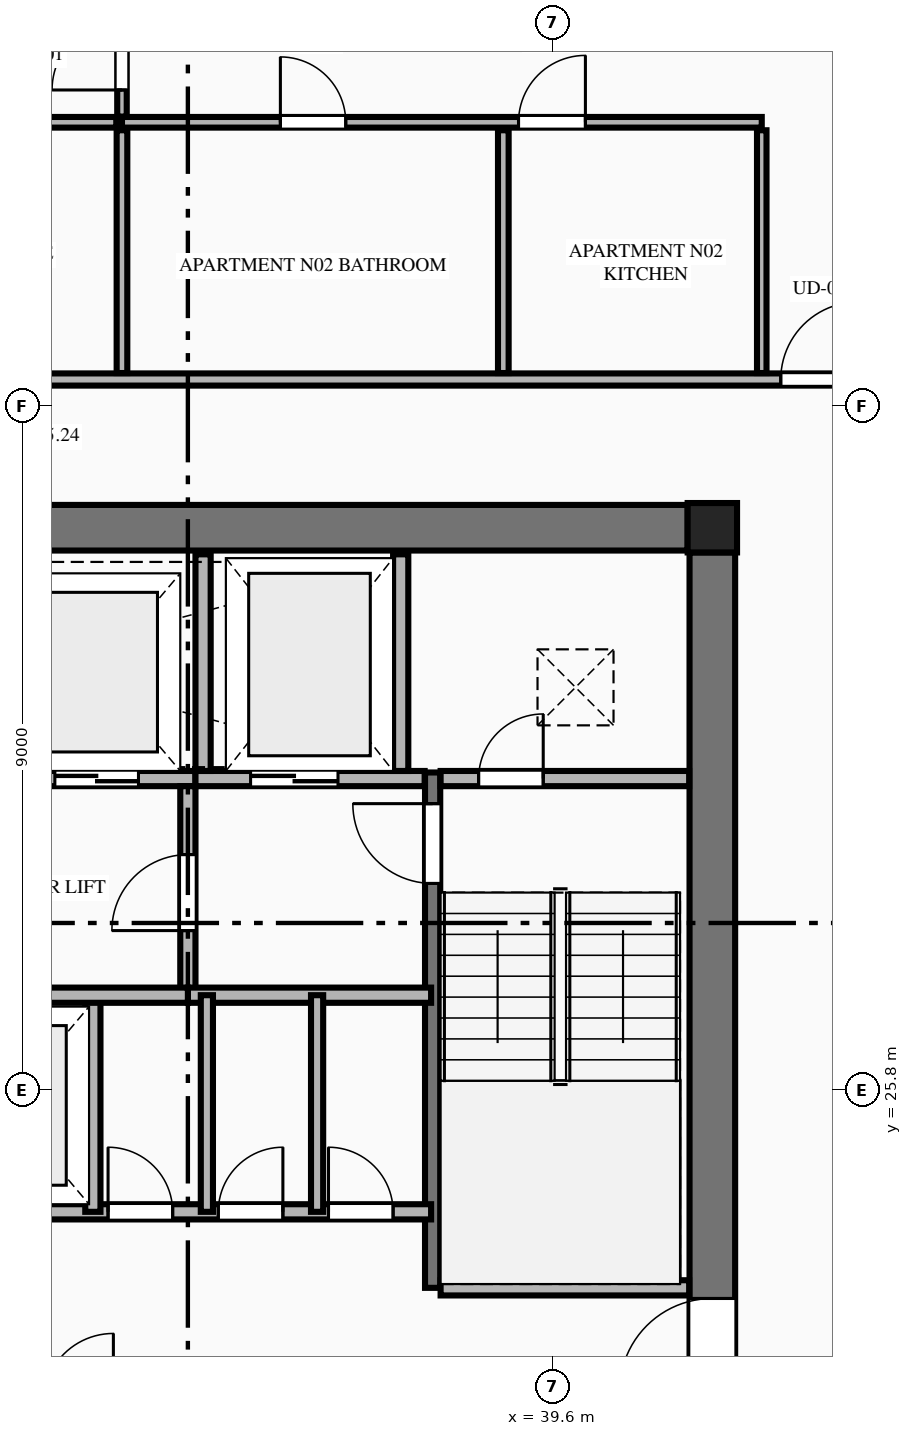
"""IFC4 building model, lengths in metres.
Left out: names, types, materials, properties, quantities, classifications, styles, units other than length and angle.
Written with IfcOpenShell. Run it as: python <this file> out.ifc"""

import sys

from ifc_helpers import new_model, si_unit, direction, frame, frame_2d, origin, origin_2d, place, context, subcontext, project, spatial, rectangle, extrude, element, fill, save


model = new_model("IFC4")
c1 = context("Model", 3, precision=1e-05, world=origin(), true_north=direction((0.0, 1.0)))
c2 = subcontext(c1, "Body", "Model", "MODEL_VIEW")
j1 = project(units=[si_unit("LENGTHUNIT", "METRE"), si_unit("PLANEANGLEUNIT", "RADIAN")], contexts=[c1])
p1 = place(None, origin())
s1 = spatial("IfcSite", under=j1, at=p1, CompositionType="ELEMENT")
p2 = place(p1, origin())
s2 = spatial("IfcBuilding", under=s1, at=p2, CompositionType="ELEMENT")
p3 = place(p2, frame((0.0, 0.0, 193.2)))
s3 = spatial("IfcBuildingStorey", under=s2, at=p3, CompositionType="ELEMENT", Elevation=193.2)
p4 = place(p3, frame((41.7, 33.2, 0.0), z_axis=(0.0, 0.0, 1.0), x_axis=(1.0, 0.0, 0.0)))
e1 = element("IfcColumn", 1, at=p4, inside=s3, PredefinedType="COLUMN", context=c2, shape_type="SweptSolid", body=[
    extrude(rectangle(XDim=0.65, YDim=0.65, at=origin_2d()), origin(), (0.0, 0.0, 1.0), 3.55),
])
p5 = place(p3, frame((23.425, 33.2, 0.0), z_axis=(0.0, 0.0, 1.0), x_axis=(1.0, 0.0, 0.0)))
e2 = element("IfcWall", 2, at=p5, inside=s3, PredefinedType="SHEAR", context=c2, shape_type="SweptSolid", body=[
    extrude(rectangle(XDim=17.95, YDim=0.6, at=frame_2d((8.975, 0.0))), origin(), (0.0, 0.0, 1.0), 3.35),
])
p6 = place(p3, frame((41.7, 18.925, 0.0), z_axis=(0.0, 0.0, 1.0), x_axis=(0.0, 1.0, 0.0)))
e3 = element("IfcWall", 3, at=p6, inside=s3, PredefinedType="SHEAR", context=c2, shape_type="SweptSolid", body=[
    extrude(rectangle(XDim=13.95, YDim=0.6, at=frame_2d((6.975, 0.0))), origin(), (0.0, 0.0, 1.0), 3.35),
])
p7 = place(p6, frame((2.915, 0.0, 0.0)))
e4 = element("IfcOpeningElement", 4, at=p7, cuts=e3, PredefinedType="OPENING", context=c2, shape_type="SweptSolid", body=[
    extrude(rectangle(XDim=1.22, YDim=2.25, at=frame_2d((0.61, 1.125))), frame((0.0, 0.31, 0.0), z_axis=(0.0, -1.0, 0.0), x_axis=(1.0, 0.0, 0.0)), (0.0, 0.0, 1.0), 0.62),
])
p8 = place(p3, frame((38.02, 23.2, 0.0), z_axis=(0.0, 0.0, 1.0), x_axis=(0.0, 1.0, 0.0)))
e5 = element("IfcWall", 5, at=p8, inside=s3, PredefinedType="SHEAR", context=c2, shape_type="SweptSolid", body=[
    extrude(rectangle(XDim=6.78, YDim=0.2, at=frame_2d((3.39, 0.0))), origin(), (0.0, 0.0, 1.0), 3.55),
])
p9 = place(p8, frame((5.32, 0.0, 0.0)))
e6 = element("IfcOpeningElement", 6, at=p9, cuts=e5, PredefinedType="OPENING", context=c2, shape_type="SweptSolid", body=[
    extrude(rectangle(XDim=1.05, YDim=2.15, at=frame_2d((0.525, 1.075))), frame((0.0, 0.11, 0.0), z_axis=(0.0, -1.0, 0.0), x_axis=(1.0, 0.0, 0.0)), (0.0, 0.0, 1.0), 0.22),
])
p10 = place(p3, frame((38.125, 23.2, 0.0), z_axis=(0.0, 0.0, 1.0), x_axis=(1.0, 0.0, 0.0)))
e7 = element("IfcWall", 7, at=p10, inside=s3, PredefinedType="PLUMBINGWALL", context=c2, shape_type="SweptSolid", body=[
    extrude(rectangle(XDim=3.27, YDim=0.2, at=frame_2d((1.635, 0.0))), origin(), (0.0, 0.0, 1.0), 3.35),
])
p11 = place(p3, frame((29.9, 29.9, 0.0), z_axis=(0.0, 0.0, 1.0), x_axis=(1.0, 0.0, 0.0)))
e8 = element("IfcWall", 8, at=p11, inside=s3, PredefinedType="PLUMBINGWALL", context=c2, shape_type="SweptSolid", body=[
    extrude(rectangle(XDim=5.0, YDim=0.2, at=frame_2d((2.5, 0.0))), origin(), (0.0, 0.0, 1.0), 3.35),
])
p12 = place(p11, frame((0.75, 0.0, 0.0)))
e9 = element("IfcOpeningElement", 9, at=p12, cuts=e8, PredefinedType="OPENING", context=c2, shape_type="SweptSolid", body=[
    extrude(rectangle(XDim=1.1, YDim=2.2, at=frame_2d((0.55, 1.1))), frame((0.0, 0.11, 0.0), z_axis=(0.0, -1.0, 0.0), x_axis=(1.0, 0.0, 0.0)), (0.0, 0.0, 1.0), 0.22),
])
p13 = place(p11, frame((3.15, 0.0, 0.0)))
e10 = element("IfcOpeningElement", 10, at=p13, cuts=e8, PredefinedType="OPENING", context=c2, shape_type="SweptSolid", body=[
    extrude(rectangle(XDim=1.1, YDim=2.2, at=frame_2d((0.55, 1.1))), frame((0.0, 0.11, 0.0), z_axis=(0.0, -1.0, 0.0), x_axis=(1.0, 0.0, 0.0)), (0.0, 0.0, 1.0), 0.22),
])
p14 = place(p3, frame((34.9, 29.9, 0.0), z_axis=(0.0, 0.0, 1.0), x_axis=(1.0, 0.0, 0.0)))
e11 = element("IfcWall", 11, at=p14, inside=s3, PredefinedType="PLUMBINGWALL", context=c2, shape_type="SweptSolid", body=[
    extrude(rectangle(XDim=3.015, YDim=0.2, at=frame_2d((1.508, 0.0))), origin(), (0.0, 0.0, 1.0), 3.35),
])
p15 = place(p14, frame((0.725, 0.0, 0.0)))
e12 = element("IfcOpeningElement", 12, at=p15, cuts=e11, PredefinedType="OPENING", context=c2, shape_type="SweptSolid", body=[
    extrude(rectangle(XDim=1.15, YDim=2.2, at=frame_2d((0.575, 1.1))), frame((0.0, 0.11, 0.0), z_axis=(0.0, -1.0, 0.0), x_axis=(1.0, 0.0, 0.0)), (0.0, 0.0, 1.0), 0.22),
])
p16 = place(p3, frame((38.125, 29.9, 0.0), z_axis=(0.0, 0.0, 1.0), x_axis=(1.0, 0.0, 0.0)))
e13 = element("IfcWall", 13, at=p16, inside=s3, PredefinedType="PLUMBINGWALL", context=c2, shape_type="SweptSolid", body=[
    extrude(rectangle(XDim=3.27, YDim=0.2, at=frame_2d((1.635, 0.0))), origin(), (0.0, 0.0, 1.0), 3.35),
])
p17 = place(p16, frame((0.5, 0.0, 0.0)))
e14 = element("IfcOpeningElement", 14, at=p17, cuts=e13, PredefinedType="OPENING", context=c2, shape_type="SweptSolid", body=[
    extrude(rectangle(XDim=0.85, YDim=2.05, at=frame_2d((0.425, 1.025))), frame((0.0, 0.11, 0.0), z_axis=(0.0, -1.0, 0.0), x_axis=(1.0, 0.0, 0.0)), (0.0, 0.0, 1.0), 0.22),
])
for number, where, z_axis, x_axis in (
    (15, (35.0, 30.0, 0.0), (0.0, 0.0, 1.0), (0.0, 1.0, 0.0)),
    (16, (37.6, 30.0, 0.0), (0.0, 0.0, 1.0), (0.0, 1.0, 0.0)),
):
    element("IfcWall", number, at=place(p3, frame(where, z_axis=z_axis, x_axis=x_axis)), inside=s3, PredefinedType="PLUMBINGWALL", context=c2, shape_type="SweptSolid", body=[
        extrude(rectangle(XDim=2.85, YDim=0.2, at=frame_2d((1.425, 0.0))), origin(), (0.0, 0.0, 1.0), 3.35),
    ])
p18 = place(p3, frame((34.8, 27.05, 0.0), z_axis=(0.0, 0.0, 1.0), x_axis=(0.0, 1.0, 0.0)))
e17 = element("IfcWall", 17, at=p18, inside=s3, PredefinedType="PLUMBINGWALL", context=c2, shape_type="SweptSolid", body=[
    extrude(rectangle(XDim=2.75, YDim=0.2, at=frame_2d((1.375, 0.0))), origin(), (0.0, 0.0, 1.0), 3.35),
])
p19 = place(p18, frame((0.85, 0.0, 0.0)))
e18 = element("IfcOpeningElement", 18, at=p19, cuts=e17, PredefinedType="OPENING", context=c2, shape_type="SweptSolid", body=[
    extrude(rectangle(XDim=1.0, YDim=2.15, at=frame_2d((0.5, 1.075))), frame((0.0, 0.11, 0.0), z_axis=(0.0, -1.0, 0.0), x_axis=(1.0, 0.0, 0.0)), (0.0, 0.0, 1.0), 0.22),
])
p20 = place(p3, frame((34.8, 27.05, 0.0), z_axis=(0.0, 0.0, 1.0), x_axis=(1.0, 0.0, 0.0)))
e19 = element("IfcWall", 19, at=p20, inside=s3, PredefinedType="PLUMBINGWALL", context=c2, shape_type="SweptSolid", body=[
    extrude(rectangle(XDim=3.2, YDim=0.2, at=frame_2d((1.6, 0.0))), origin(), (0.0, 0.0, 1.0), 3.35),
])
p21 = place(p3, frame((31.2, 24.2, 0.0), z_axis=(0.0, 0.0, 1.0), x_axis=(1.0, 0.0, 0.0)))
e20 = element("IfcWall", 20, at=p21, inside=s3, PredefinedType="PLUMBINGWALL", context=c2, shape_type="SweptSolid", body=[
    extrude(rectangle(XDim=6.8, YDim=0.2, at=frame_2d((3.4, 0.0))), origin(), (0.0, 0.0, 1.0), 3.35),
])
p22 = place(p21, frame((0.65, 0.0, 0.0)))
e21 = element("IfcOpeningElement", 21, at=p22, cuts=e20, PredefinedType="OPENING", context=c2, shape_type="SweptSolid", body=[
    extrude(rectangle(XDim=1.1, YDim=2.2, at=frame_2d((0.55, 1.1))), frame((0.0, 0.11, 0.0), z_axis=(0.0, -1.0, 0.0), x_axis=(1.0, 0.0, 0.0)), (0.0, 0.0, 1.0), 0.22),
])
p23 = place(p21, frame((2.55, 0.0, 0.0)))
e22 = element("IfcOpeningElement", 22, at=p23, cuts=e20, PredefinedType="OPENING", context=c2, shape_type="SweptSolid", body=[
    extrude(rectangle(XDim=0.85, YDim=2.05, at=frame_2d((0.425, 1.025))), frame((0.0, 0.11, 0.0), z_axis=(0.0, -1.0, 0.0), x_axis=(1.0, 0.0, 0.0)), (0.0, 0.0, 1.0), 0.22),
])
p24 = place(p21, frame((4.0, 0.0, 0.0)))
e23 = element("IfcOpeningElement", 23, at=p24, cuts=e20, PredefinedType="OPENING", context=c2, shape_type="SweptSolid", body=[
    extrude(rectangle(XDim=0.85, YDim=2.05, at=frame_2d((0.425, 1.025))), frame((0.0, 0.11, 0.0), z_axis=(0.0, -1.0, 0.0), x_axis=(1.0, 0.0, 0.0)), (0.0, 0.0, 1.0), 0.22),
])
p25 = place(p21, frame((5.45, 0.0, 0.0)))
e24 = element("IfcOpeningElement", 24, at=p25, cuts=e20, PredefinedType="OPENING", context=c2, shape_type="SweptSolid", body=[
    extrude(rectangle(XDim=0.85, YDim=2.05, at=frame_2d((0.425, 1.025))), frame((0.0, 0.11, 0.0), z_axis=(0.0, -1.0, 0.0), x_axis=(1.0, 0.0, 0.0)), (0.0, 0.0, 1.0), 0.22),
])
p26 = place(p3, frame((33.55, 24.2, 0.0), z_axis=(0.0, 0.0, 1.0), x_axis=(0.0, 1.0, 0.0)))
e25 = element("IfcWall", 25, at=p26, inside=s3, PredefinedType="PLUMBINGWALL", context=c2, shape_type="SweptSolid", body=[
    extrude(rectangle(XDim=2.85, YDim=0.2, at=frame_2d((1.425, 0.0))), origin(), (0.0, 0.0, 1.0), 3.35),
])
p27 = place(p3, frame((31.25, 27.05, 0.0), z_axis=(0.0, 0.0, 1.0), x_axis=(1.0, 0.0, 0.0)))
e26 = element("IfcWall", 26, at=p27, inside=s3, PredefinedType="PLUMBINGWALL", context=c2, shape_type="SweptSolid", body=[
    extrude(rectangle(XDim=3.55, YDim=0.2, at=frame_2d((1.775, 0.0))), origin(), (0.0, 0.0, 1.0), 3.35),
])
for number, where, z_axis, x_axis in (
    (27, (35.05, 24.2, 0.0), (0.0, 0.0, 1.0), (0.0, 1.0, 0.0)),
    (28, (36.5, 24.2, 0.0), (0.0, 0.0, 1.0), (0.0, 1.0, 0.0)),
):
    element("IfcWall", number, at=place(p3, frame(where, z_axis=z_axis, x_axis=x_axis)), inside=s3, PredefinedType="PARTITIONING", context=c2, shape_type="SweptSolid", body=[
        extrude(rectangle(XDim=2.85, YDim=0.16, at=frame_2d((1.425, 0.0))), origin(), (0.0, 0.0, 1.0), 3.35),
    ])
p28 = place(p3, frame((28.952, 35.15, 0.0), z_axis=(0.0, 0.0, 1.0), x_axis=(1.0, 0.0, 0.0)))
e29 = element("IfcWall", 29, at=p28, inside=s3, PredefinedType="PARTITIONING", context=c2, shape_type="SweptSolid", body=[
    extrude(rectangle(XDim=15.553, YDim=0.16, at=frame_2d((7.776, 0.0))), origin(), (0.0, 0.0, 1.0), 3.35),
])
p29 = place(p28, frame((13.648, 0.0, 0.0)))
e30 = element("IfcOpeningElement", 30, at=p29, cuts=e29, PredefinedType="OPENING", context=c2, shape_type="SweptSolid", body=[
    extrude(rectangle(XDim=1.02, YDim=2.25, at=frame_2d((0.51, 1.125))), frame((0.0, 0.09, 0.0), z_axis=(0.0, -1.0, 0.0), x_axis=(1.0, 0.0, 0.0)), (0.0, 0.0, 1.0), 0.18),
])
p30 = place(p3, frame((42.35, 35.235, 0.0), z_axis=(0.0, 0.0, 1.0), x_axis=(0.0, 1.0, 0.0)))
e31 = element("IfcWall", 31, at=p30, inside=s3, PredefinedType="PARTITIONING", context=c2, shape_type="SweptSolid", body=[
    extrude(rectangle(XDim=3.194, YDim=0.125, at=frame_2d((1.597, 0.0))), origin(), (0.0, 0.0, 1.0), 2.807),
])
p31 = place(p3, frame((33.933, 38.534, 0.0), z_axis=(0.0, 0.0, 1.0), x_axis=(1.0, 0.0, 0.0)))
e32 = element("IfcWall", 32, at=p31, inside=s3, PredefinedType="PLUMBINGWALL", context=c2, shape_type="SweptSolid", body=[
    extrude(rectangle(XDim=8.417, YDim=0.14, at=frame_2d((4.208, 0.0))), origin(), (0.0, 0.0, 1.0), 3.35),
])
p32 = place(p31, frame((2.084, 0.0, 0.0)))
e33 = element("IfcOpeningElement", 33, at=p32, cuts=e32, PredefinedType="OPENING", context=c2, shape_type="SweptSolid", body=[
    extrude(rectangle(XDim=0.86, YDim=2.1, at=frame_2d((0.43, 1.05))), frame((0.0, 0.08, 0.0), z_axis=(0.0, -1.0, 0.0), x_axis=(1.0, 0.0, 0.0)), (0.0, 0.0, 1.0), 0.16),
])
p33 = place(p31, frame((5.217, 0.0, 0.0)))
e34 = element("IfcOpeningElement", 34, at=p33, cuts=e32, PredefinedType="OPENING", context=c2, shape_type="SweptSolid", body=[
    extrude(rectangle(XDim=0.88, YDim=2.15, at=frame_2d((0.44, 1.075))), frame((0.0, 0.08, 0.0), z_axis=(0.0, -1.0, 0.0), x_axis=(1.0, 0.0, 0.0)), (0.0, 0.0, 1.0), 0.16),
])
p34 = place(p3, frame((28.952, 38.534, 0.0), z_axis=(0.0, 0.0, 1.0), x_axis=(1.0, 0.0, 0.0)))
e35 = element("IfcWall", 35, at=p34, inside=s3, PredefinedType="PLUMBINGWALL", context=c2, shape_type="SweptSolid", body=[
    extrude(rectangle(XDim=4.906, YDim=0.14, at=frame_2d((2.453, 0.0))), origin(), (0.0, 0.0, 1.0), 3.35),
])
p35 = place(p34, frame((2.028, 0.0, 0.0)))
e36 = element("IfcOpeningElement", 36, at=p35, cuts=e35, PredefinedType="OPENING", context=c2, shape_type="SweptSolid", body=[
    extrude(rectangle(XDim=0.86, YDim=2.1, at=frame_2d((0.43, 1.05))), frame((0.0, 0.08, 0.0), z_axis=(0.0, -1.0, 0.0), x_axis=(1.0, 0.0, 0.0)), (0.0, 0.0, 1.0), 0.16),
])
for number, where, z_axis, x_axis in (
    (37, (38.95, 35.235, 0.0), (0.0, 0.0, 1.0), (0.0, 1.0, 0.0)),
    (38, (33.933, 35.235, 0.0), (0.0, 0.0, 1.0), (0.0, 1.0, 0.0)),
):
    element("IfcWall", number, at=place(p3, frame(where, z_axis=z_axis, x_axis=x_axis)), inside=s3, PredefinedType="PLUMBINGWALL", context=c2, shape_type="SweptSolid", body=[
        extrude(rectangle(XDim=3.194, YDim=0.14, at=frame_2d((1.597, 0.0))), origin(), (0.0, 0.0, 1.0), 3.35),
    ])
p36 = place(p3, frame((33.933, 38.609, 0.0), z_axis=(0.0, 0.0, 1.0), x_axis=(0.0, 1.0, 0.0)))
e39 = element("IfcWall", 39, at=p36, inside=s3, PredefinedType="PARTITIONING", context=c2, shape_type="SweptSolid", body=[
    extrude(rectangle(XDim=7.326, YDim=0.125, at=frame_2d((3.663, 0.0))), origin(), (0.0, 0.0, 1.0), 3.35),
])
p37 = place(p36, frame((0.35, 0.0, 0.0)))
e40 = element("IfcOpeningElement", 40, at=p37, cuts=e39, PredefinedType="OPENING", context=c2, shape_type="SweptSolid", body=[
    extrude(rectangle(XDim=0.92, YDim=2.15, at=frame_2d((0.46, 1.075))), frame((0.0, 0.073, 0.0), z_axis=(0.0, -1.0, 0.0), x_axis=(1.0, 0.0, 0.0)), (0.0, 0.0, 1.0), 0.145),
])
p38 = place(p7, origin())
e41 = element("IfcDoor", 41, at=p38, inside=s3, OperationType="SINGLE_SWING_LEFT", PredefinedType="DOOR", context=c2, shape_type="SweptSolid", body=[
    extrude(rectangle(XDim=1.22, YDim=2.25, at=frame_2d((0.61, 1.125))), frame((0.0, 0.025, 0.0), z_axis=(0.0, -1.0, 0.0), x_axis=(1.0, 0.0, 0.0)), (0.0, 0.0, 1.0), 0.05),
])
fill(e4, e41)
p39 = place(p9, origin())
e42 = element("IfcDoor", 42, at=p39, inside=s3, OperationType="SINGLE_SWING_RIGHT", PredefinedType="DOOR", context=c2, shape_type="SweptSolid", body=[
    extrude(rectangle(XDim=1.05, YDim=2.15, at=frame_2d((0.525, 1.075))), frame((0.0, 0.025, 0.0), z_axis=(0.0, -1.0, 0.0), x_axis=(1.0, 0.0, 0.0)), (0.0, 0.0, 1.0), 0.05),
])
fill(e6, e42)
p40 = place(p17, origin())
e43 = element("IfcDoor", 43, at=p40, inside=s3, OperationType="SINGLE_SWING_RIGHT", PredefinedType="DOOR", context=c2, shape_type="SweptSolid", body=[
    extrude(rectangle(XDim=0.85, YDim=2.05, at=frame_2d((0.425, 1.025))), frame((0.0, 0.025, 0.0), z_axis=(0.0, -1.0, 0.0), x_axis=(1.0, 0.0, 0.0)), (0.0, 0.0, 1.0), 0.05),
])
fill(e14, e43)
p41 = place(p15, origin())
e44 = element("IfcDoor", 44, at=p41, inside=s3, OperationType="DOUBLE_DOOR_SLIDING", PredefinedType="DOOR", context=c2, shape_type="SweptSolid", body=[
    extrude(rectangle(XDim=1.15, YDim=2.2, at=frame_2d((0.575, 1.1))), frame((0.0, 0.025, 0.0), z_axis=(0.0, -1.0, 0.0), x_axis=(1.0, 0.0, 0.0)), (0.0, 0.0, 1.0), 0.05),
])
fill(e12, e44)
p42 = place(p13, origin())
e45 = element("IfcDoor", 45, at=p42, inside=s3, OperationType="DOUBLE_DOOR_SLIDING", PredefinedType="DOOR", context=c2, shape_type="SweptSolid", body=[
    extrude(rectangle(XDim=1.1, YDim=2.2, at=frame_2d((0.55, 1.1))), frame((0.0, 0.025, 0.0), z_axis=(0.0, -1.0, 0.0), x_axis=(1.0, 0.0, 0.0)), (0.0, 0.0, 1.0), 0.05),
])
fill(e10, e45)
p43 = place(p19, origin())
e46 = element("IfcDoor", 46, at=p43, inside=s3, OperationType="SINGLE_SWING_LEFT", PredefinedType="DOOR", context=c2, shape_type="SweptSolid", body=[
    extrude(rectangle(XDim=1.0, YDim=2.15, at=frame_2d((0.5, 1.075))), frame((0.0, 0.025, 0.0), z_axis=(0.0, -1.0, 0.0), x_axis=(1.0, 0.0, 0.0)), (0.0, 0.0, 1.0), 0.05),
])
fill(e18, e46)
p44 = place(p23, origin())
e47 = element("IfcDoor", 47, at=p44, inside=s3, OperationType="SINGLE_SWING_LEFT", PredefinedType="DOOR", context=c2, shape_type="SweptSolid", body=[
    extrude(rectangle(XDim=0.85, YDim=2.05, at=frame_2d((0.425, 1.025))), frame((0.0, 0.025, 0.0), z_axis=(0.0, -1.0, 0.0), x_axis=(1.0, 0.0, 0.0)), (0.0, 0.0, 1.0), 0.05),
])
fill(e22, e47)
p45 = place(p24, origin())
e48 = element("IfcDoor", 48, at=p45, inside=s3, OperationType="SINGLE_SWING_RIGHT", PredefinedType="DOOR", context=c2, shape_type="SweptSolid", body=[
    extrude(rectangle(XDim=0.85, YDim=2.05, at=frame_2d((0.425, 1.025))), frame((0.0, 0.025, 0.0), z_axis=(0.0, -1.0, 0.0), x_axis=(1.0, 0.0, 0.0)), (0.0, 0.0, 1.0), 0.05),
])
fill(e23, e48)
p46 = place(p25, origin())
e49 = element("IfcDoor", 49, at=p46, inside=s3, OperationType="SINGLE_SWING_LEFT", PredefinedType="DOOR", context=c2, shape_type="SweptSolid", body=[
    extrude(rectangle(XDim=0.85, YDim=2.05, at=frame_2d((0.425, 1.025))), frame((0.0, 0.025, 0.0), z_axis=(0.0, -1.0, 0.0), x_axis=(1.0, 0.0, 0.0)), (0.0, 0.0, 1.0), 0.05),
])
fill(e24, e49)
p47 = place(p32, origin())
e50 = element("IfcDoor", 50, at=p47, inside=s3, OperationType="SINGLE_SWING_LEFT", PredefinedType="DOOR", context=c2, shape_type="SweptSolid", body=[
    extrude(rectangle(XDim=0.86, YDim=2.1, at=frame_2d((0.43, 1.05))), frame((0.0, 0.025, 0.0), z_axis=(0.0, -1.0, 0.0), x_axis=(1.0, 0.0, 0.0)), (0.0, 0.0, 1.0), 0.05),
])
fill(e33, e50)
p48 = place(p29, origin())
e51 = element("IfcDoor", 51, at=p48, inside=s3, OperationType="SINGLE_SWING_RIGHT", PredefinedType="DOOR", context=c2, shape_type="SweptSolid", body=[
    extrude(rectangle(XDim=1.02, YDim=2.25, at=frame_2d((0.51, 1.125))), frame((0.0, 0.025, 0.0), z_axis=(0.0, -1.0, 0.0), x_axis=(1.0, 0.0, 0.0)), (0.0, 0.0, 1.0), 0.05),
])
fill(e30, e51)
p49 = place(p33, origin())
e52 = element("IfcDoor", 52, at=p49, inside=s3, OperationType="SINGLE_SWING_RIGHT", PredefinedType="DOOR", context=c2, shape_type="SweptSolid", body=[
    extrude(rectangle(XDim=0.88, YDim=2.15, at=frame_2d((0.44, 1.075))), frame((0.0, 0.025, 0.0), z_axis=(0.0, -1.0, 0.0), x_axis=(1.0, 0.0, 0.0)), (0.0, 0.0, 1.0), 0.05),
])
fill(e34, e52)
p50 = place(p37, origin())
e53 = element("IfcDoor", 53, at=p50, inside=s3, OperationType="SINGLE_SWING_LEFT", PredefinedType="DOOR", context=c2, shape_type="SweptSolid", body=[
    extrude(rectangle(XDim=0.92, YDim=2.15, at=frame_2d((0.46, 1.075))), frame((0.0, 0.025, 0.0), z_axis=(0.0, -1.0, 0.0), x_axis=(1.0, 0.0, 0.0)), (0.0, 0.0, 1.0), 0.05),
])
fill(e40, e53)
save(model, sys.argv[1])
